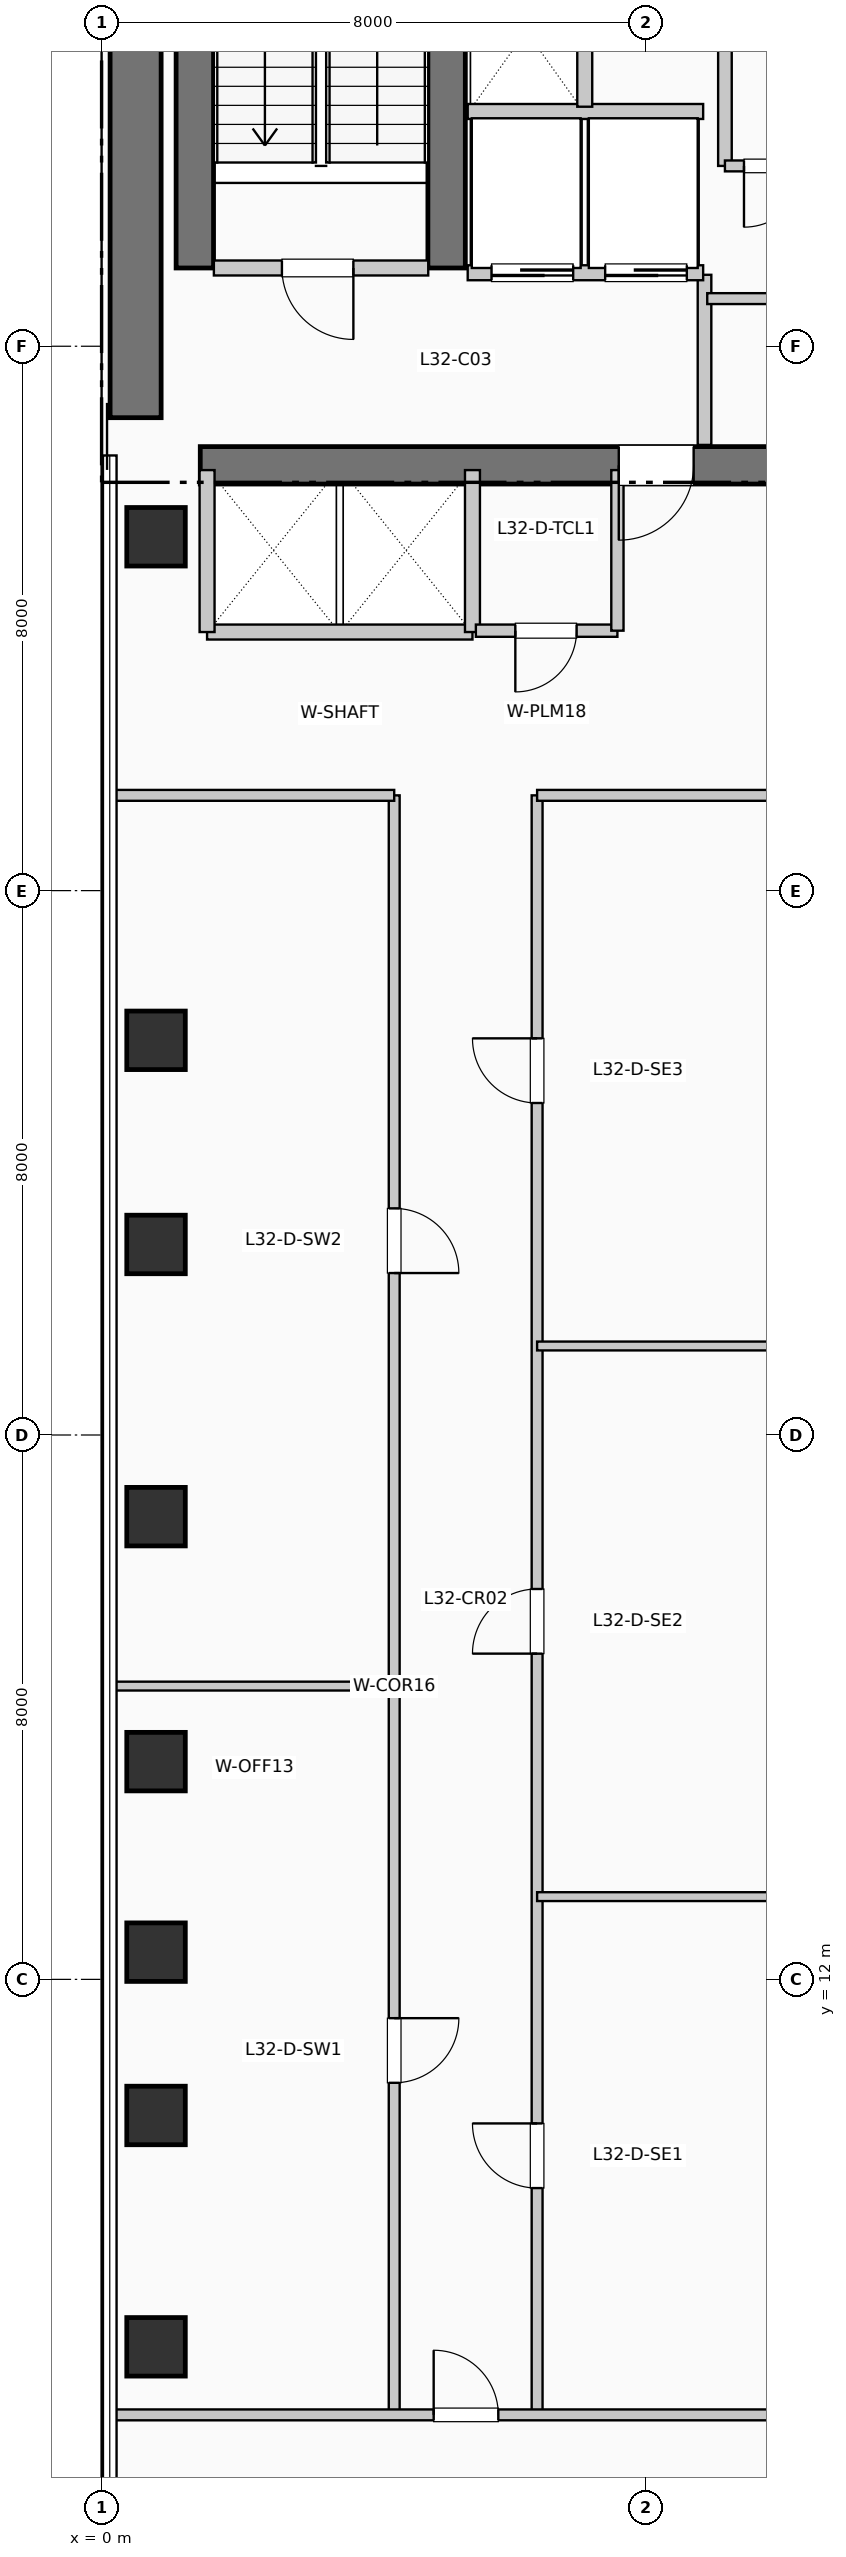
"""IFC4 building model, lengths in metres.
Left out: names, types, materials, properties, quantities, classifications, styles, units other than length and angle.
Written with IfcOpenShell. Run it as: python <this file> out.ifc"""

import sys

from ifc_helpers import new_model, si_unit, direction, frame, frame_2d, origin, origin_2d, place, context, subcontext, project, spatial, rectangle, extrude, element, fill, save


model = new_model("IFC4")
c1 = context("Model", 3, precision=1e-05, world=origin(), true_north=direction((0.0, 1.0)))
c2 = subcontext(c1, "Body", "Model", "MODEL_VIEW")
j1 = project(units=[si_unit("LENGTHUNIT", "METRE"), si_unit("PLANEANGLEUNIT", "RADIAN")], contexts=[c1])
p1 = place(None, origin())
s1 = spatial("IfcSite", under=j1, at=p1, CompositionType="ELEMENT")
p2 = place(p1, origin())
s2 = spatial("IfcBuilding", under=s1, at=p2, CompositionType="ELEMENT")
p3 = place(p2, frame((0.0, 0.0, 134.97)))
s3 = spatial("IfcBuildingStorey", under=s2, at=p3, CompositionType="ELEMENT", Elevation=134.97)
p4 = place(p3, frame((0.5, 34.95, 0.0), z_axis=(0.0, 0.0, 1.0), x_axis=(0.0, 1.0, 0.0)))
e1 = element("IfcWall", 1, at=p4, inside=s3, PredefinedType="SHEAR", context=c2, shape_type="SweptSolid", body=[
    extrude(rectangle(XDim=7.9, YDim=0.75, at=frame_2d((3.95, 0.0))), origin(), (0.0, 0.0, 1.0), 3.96),
])
p5 = place(p3, frame((1.45, 34.25, 0.0), z_axis=(0.0, 0.0, 1.0), x_axis=(1.0, 0.0, 0.0)))
e2 = element("IfcWall", 2, at=p5, inside=s3, PredefinedType="SHEAR", context=c2, shape_type="SweptSolid", body=[
    extrude(rectangle(XDim=10.71, YDim=0.55, at=frame_2d((5.355, 0.0))), origin(), (0.0, 0.0, 1.0), 3.96),
])
p6 = place(p5, frame((7.25, 0.0, 0.0), z_axis=(0.0, 0.0, 1.0), x_axis=(-1.0, 0.0, 0.0)))
e3 = element("IfcOpeningElement", 3, at=p6, cuts=e2, PredefinedType="OPENING", context=c2, shape_type="SweptSolid", body=[
    extrude(rectangle(XDim=1.1, YDim=2.15, at=frame_2d((0.55, 1.075))), frame((0.0, 0.285, 0.0), z_axis=(0.0, -1.0, 0.0), x_axis=(1.0, 0.0, 0.0)), (0.0, 0.0, 1.0), 0.57),
])
for number, where, z_axis, x_axis in (
    (4, (1.37, 37.15, 0.0), (0.0, 0.0, 1.0), (0.0, 1.0, 0.0)),
    (5, (5.07, 37.15, 0.0), (0.0, 0.0, 1.0), (0.0, 1.0, 0.0)),
):
    element("IfcWall", number, at=place(p3, frame(where, z_axis=z_axis, x_axis=x_axis)), inside=s3, PredefinedType="SHEAR", context=c2, shape_type="SweptSolid", body=[
        extrude(rectangle(XDim=7.89, YDim=0.55, at=frame_2d((3.945, 0.0))), origin(), (0.0, 0.0, 1.0), 3.96),
    ])
for number, where, z_axis, x_axis in (
    (6, (0.8, 6.6, 0.0), (0.0, 0.0, 1.0), (1.0, 0.0, 0.0)),
    (7, (0.8, 10.0, 0.0), (0.0, 0.0, 1.0), (1.0, 0.0, 0.0)),
    (8, (0.8, 12.4, 0.0), (0.0, 0.0, 1.0), (1.0, 0.0, 0.0)),
    (9, (0.8, 15.2, 0.0), (0.0, 0.0, 1.0), (1.0, 0.0, 0.0)),
    (10, (0.8, 18.8, 0.0), (0.0, 0.0, 1.0), (1.0, 0.0, 0.0)),
    (11, (0.8, 22.8, 0.0), (0.0, 0.0, 1.0), (1.0, 0.0, 0.0)),
    (12, (0.8, 25.8, 0.0), (0.0, 0.0, 1.0), (1.0, 0.0, 0.0)),
    (13, (0.8, 33.2, 0.0), (0.0, 0.0, 1.0), (1.0, 0.0, 0.0)),
):
    element("IfcColumn", number, at=place(p3, frame(where, z_axis=z_axis, x_axis=x_axis)), inside=s3, PredefinedType="COLUMN", context=c2, shape_type="SweptSolid", body=[
        extrude(rectangle(XDim=0.86, YDim=0.86, at=origin_2d()), origin(), (0.0, 0.0, 1.0), 3.96),
    ])
p7 = place(p3, frame((1.65, 37.15, 0.0), z_axis=(0.0, 0.0, 1.0), x_axis=(1.0, 0.0, 0.0)))
e14 = element("IfcWall", 14, at=p7, inside=s3, PredefinedType="PARTITIONING", context=c2, shape_type="SweptSolid", body=[
    extrude(rectangle(XDim=3.15, YDim=0.22, at=frame_2d((1.575, 0.0))), origin(), (0.0, 0.0, 1.0), 3.71),
])
p8 = place(p7, frame((2.05, 0.0, 0.0), z_axis=(0.0, 0.0, 1.0), x_axis=(-1.0, 0.0, 0.0)))
e15 = element("IfcOpeningElement", 15, at=p8, cuts=e14, PredefinedType="OPENING", context=c2, shape_type="SweptSolid", body=[
    extrude(rectangle(XDim=1.05, YDim=2.15, at=frame_2d((0.525, 1.075))), frame((0.0, 0.12, 0.0), z_axis=(0.0, -1.0, 0.0), x_axis=(1.0, 0.0, 0.0)), (0.0, 0.0, 1.0), 0.24),
])
p9 = place(p3, frame((8.86, 34.55, 0.0), z_axis=(0.0, 0.0, 1.0), x_axis=(0.0, 1.0, 0.0)))
e16 = element("IfcWall", 16, at=p9, inside=s3, PredefinedType="PARTITIONING", context=c2, shape_type="SweptSolid", body=[
    extrude(rectangle(XDim=2.5, YDim=0.2, at=frame_2d((1.25, 0.0))), origin(), (0.0, 0.0, 1.0), 3.71),
])
p10 = place(p3, frame((5.38, 37.08, 0.0), z_axis=(0.0, 0.0, 1.0), x_axis=(1.0, 0.0, 0.0)))
e17 = element("IfcWall", 17, at=p10, inside=s3, PredefinedType="PARTITIONING", context=c2, shape_type="SweptSolid", body=[
    extrude(rectangle(XDim=3.46, YDim=0.22, at=frame_2d((1.73, 0.0))), origin(), (0.0, 0.0, 1.0), 3.71),
])
p11 = place(p10, frame((1.55, 0.0, 0.0), z_axis=(0.0, 0.0, 1.0), x_axis=(-1.0, 0.0, 0.0)))
e18 = element("IfcOpeningElement", 18, at=p11, cuts=e17, PredefinedType="OPENING", context=c2, shape_type="SweptSolid", body=[
    extrude(rectangle(XDim=1.2, YDim=2.2, at=frame_2d((0.6, 1.1))), frame((0.0, 0.12, 0.0), z_axis=(0.0, -1.0, 0.0), x_axis=(1.0, 0.0, 0.0)), (0.0, 0.0, 1.0), 0.24),
])
p12 = place(p10, frame((3.22, 0.0, 0.0), z_axis=(0.0, 0.0, 1.0), x_axis=(-1.0, 0.0, 0.0)))
e19 = element("IfcOpeningElement", 19, at=p12, cuts=e17, PredefinedType="OPENING", context=c2, shape_type="SweptSolid", body=[
    extrude(rectangle(XDim=1.2, YDim=2.2, at=frame_2d((0.6, 1.1))), frame((0.0, 0.12, 0.0), z_axis=(0.0, -1.0, 0.0), x_axis=(1.0, 0.0, 0.0)), (0.0, 0.0, 1.0), 0.24),
])
p13 = place(p3, frame((5.38, 39.45, 0.0), z_axis=(0.0, 0.0, 1.0), x_axis=(1.0, 0.0, 0.0)))
e20 = element("IfcWall", 20, at=p13, inside=s3, PredefinedType="PARTITIONING", context=c2, shape_type="SweptSolid", body=[
    extrude(rectangle(XDim=3.46, YDim=0.22, at=frame_2d((1.73, 0.0))), origin(), (0.0, 0.0, 1.0), 3.71),
])
p14 = place(p3, frame((7.1, 39.52, 0.0), z_axis=(0.0, 0.0, 1.0), x_axis=(0.0, 1.0, 0.0)))
e21 = element("IfcWall", 21, at=p14, inside=s3, PredefinedType="PARTITIONING", context=c2, shape_type="SweptSolid", body=[
    extrude(rectangle(XDim=2.93, YDim=0.22, at=frame_2d((1.465, 0.0))), origin(), (0.0, 0.0, 1.0), 3.71),
])
p15 = place(p3, frame((1.55, 31.8, 0.0), z_axis=(0.0, 0.0, 1.0), x_axis=(1.0, 0.0, 0.0)))
e22 = element("IfcWall", 22, at=p15, inside=s3, PredefinedType="PARTITIONING", context=c2, shape_type="SweptSolid", body=[
    extrude(rectangle(XDim=3.9, YDim=0.22, at=frame_2d((1.95, 0.0))), origin(), (0.0, 0.0, 1.0), 3.71),
])
for number, where, z_axis, x_axis in (
    (23, (1.55, 31.8, 0.0), (0.0, 0.0, 1.0), (0.0, 1.0, 0.0)),
    (24, (5.45, 31.8, 0.0), (0.0, 0.0, 1.0), (0.0, 1.0, 0.0)),
):
    element("IfcWall", number, at=place(p3, frame(where, z_axis=z_axis, x_axis=x_axis)), inside=s3, PredefinedType="PARTITIONING", context=c2, shape_type="SweptSolid", body=[
        extrude(rectangle(XDim=2.38, YDim=0.22, at=frame_2d((1.19, 0.0))), origin(), (0.0, 0.0, 1.0), 3.71),
    ])
p16 = place(p3, frame((9.16, 38.65, 0.0), z_axis=(0.0, 0.0, 1.0), x_axis=(0.0, 1.0, 0.0)))
e25 = element("IfcWall", 25, at=p16, inside=s3, PredefinedType="PARTITIONING", context=c2, shape_type="SweptSolid", body=[
    extrude(rectangle(XDim=2.35, YDim=0.2, at=frame_2d((1.175, 0.0))), origin(), (0.0, 0.0, 1.0), 3.71),
])
p17 = place(p3, frame((5.5, 31.82, 0.0), z_axis=(0.0, 0.0, 1.0), x_axis=(1.0, 0.0, 0.0)))
e26 = element("IfcWall", 26, at=p17, inside=s3, PredefinedType="PLUMBINGWALL", context=c2, shape_type="SweptSolid", body=[
    extrude(rectangle(XDim=2.08, YDim=0.18, at=frame_2d((1.04, 0.0))), origin(), (0.0, 0.0, 1.0), 3.71),
])
p18 = place(p17, frame((1.48, 0.0, 0.0), z_axis=(0.0, 0.0, 1.0), x_axis=(-1.0, 0.0, 0.0)))
e27 = element("IfcOpeningElement", 27, at=p18, cuts=e26, PredefinedType="OPENING", context=c2, shape_type="SweptSolid", body=[
    extrude(rectangle(XDim=0.9, YDim=2.1, at=frame_2d((0.45, 1.05))), frame((0.0, 0.1, 0.0), z_axis=(0.0, -1.0, 0.0), x_axis=(1.0, 0.0, 0.0)), (0.0, 0.0, 1.0), 0.2),
])
p19 = place(p3, frame((7.58, 31.82, 0.0), z_axis=(0.0, 0.0, 1.0), x_axis=(0.0, 1.0, 0.0)))
e28 = element("IfcWall", 28, at=p19, inside=s3, PredefinedType="PLUMBINGWALL", context=c2, shape_type="SweptSolid", body=[
    extrude(rectangle(XDim=2.36, YDim=0.18, at=frame_2d((1.18, 0.0))), origin(), (0.0, 0.0, 1.0), 3.71),
])
p20 = place(p3, frame((8.9, 36.7, 0.0), z_axis=(0.0, 0.0, 1.0), x_axis=(1.0, 0.0, 0.0)))
e29 = element("IfcWall", 29, at=p20, inside=s3, PredefinedType="PARTITIONING", context=c2, shape_type="SweptSolid", body=[
    extrude(rectangle(XDim=3.25, YDim=0.16, at=frame_2d((1.625, 0.0))), origin(), (0.0, 0.0, 1.0), 3.71),
])
p21 = place(p20, frame((1.1, 0.0, 0.0)))
e30 = element("IfcOpeningElement", 30, at=p21, cuts=e29, PredefinedType="OPENING", context=c2, shape_type="SweptSolid", body=[
    extrude(rectangle(XDim=0.95, YDim=2.15, at=frame_2d((0.475, 1.075))), frame((0.0, 0.09, 0.0), z_axis=(0.0, -1.0, 0.0), x_axis=(1.0, 0.0, 0.0)), (0.0, 0.0, 1.0), 0.18),
])
p22 = place(p3, frame((9.16, 38.65, 0.0), z_axis=(0.0, 0.0, 1.0), x_axis=(1.0, 0.0, 0.0)))
e31 = element("IfcWall", 31, at=p22, inside=s3, PredefinedType="PARTITIONING", context=c2, shape_type="SweptSolid", body=[
    extrude(rectangle(XDim=3.42, YDim=0.16, at=frame_2d((1.71, 0.0))), origin(), (0.0, 0.0, 1.0), 3.71),
])
p23 = place(p22, frame((1.18, 0.0, 0.0), z_axis=(0.0, 0.0, 1.0), x_axis=(-1.0, 0.0, 0.0)))
e32 = element("IfcOpeningElement", 32, at=p23, cuts=e31, PredefinedType="OPENING", context=c2, shape_type="SweptSolid", body=[
    extrude(rectangle(XDim=0.9, YDim=2.15, at=frame_2d((0.45, 1.075))), frame((0.0, 0.09, 0.0), z_axis=(0.0, -1.0, 0.0), x_axis=(1.0, 0.0, 0.0)), (0.0, 0.0, 1.0), 0.18),
])
p24 = place(p22, frame((2.6, 0.0, 0.0), z_axis=(0.0, 0.0, 1.0), x_axis=(-1.0, 0.0, 0.0)))
e33 = element("IfcOpeningElement", 33, at=p24, cuts=e31, PredefinedType="OPENING", context=c2, shape_type="SweptSolid", body=[
    extrude(rectangle(XDim=0.9, YDim=2.15, at=frame_2d((0.45, 1.075))), frame((0.0, 0.09, 0.0), z_axis=(0.0, -1.0, 0.0), x_axis=(1.0, 0.0, 0.0)), (0.0, 0.0, 1.0), 0.18),
])
p25 = place(p3, frame((4.3, 5.6, 0.0), z_axis=(0.0, 0.0, 1.0), x_axis=(0.0, 1.0, 0.0)))
e34 = element("IfcWall", 34, at=p25, inside=s3, PredefinedType="PARTITIONING", context=c2, shape_type="SweptSolid", body=[
    extrude(rectangle(XDim=23.8, YDim=0.16, at=frame_2d((11.9, 0.0))), origin(), (0.0, 0.0, 1.0), 3.71),
])
p26 = place(p25, frame((5.83, 0.0, 0.0), z_axis=(0.0, 0.0, 1.0), x_axis=(-1.0, 0.0, 0.0)))
e35 = element("IfcOpeningElement", 35, at=p26, cuts=e34, PredefinedType="OPENING", context=c2, shape_type="SweptSolid", body=[
    extrude(rectangle(XDim=0.95, YDim=2.15, at=frame_2d((0.475, 1.075))), frame((0.0, 0.09, 0.0), z_axis=(0.0, -1.0, 0.0), x_axis=(1.0, 0.0, 0.0)), (0.0, 0.0, 1.0), 0.18),
])
p27 = place(p25, frame((17.73, 0.0, 0.0), z_axis=(0.0, 0.0, 1.0), x_axis=(-1.0, 0.0, 0.0)))
e36 = element("IfcOpeningElement", 36, at=p27, cuts=e34, PredefinedType="OPENING", context=c2, shape_type="SweptSolid", body=[
    extrude(rectangle(XDim=0.95, YDim=2.15, at=frame_2d((0.475, 1.075))), frame((0.0, 0.09, 0.0), z_axis=(0.0, -1.0, 0.0), x_axis=(1.0, 0.0, 0.0)), (0.0, 0.0, 1.0), 0.18),
])
p28 = place(p3, frame((6.4, 5.6, 0.0), z_axis=(0.0, 0.0, 1.0), x_axis=(0.0, 1.0, 0.0)))
e37 = element("IfcWall", 37, at=p28, inside=s3, PredefinedType="PARTITIONING", context=c2, shape_type="SweptSolid", body=[
    extrude(rectangle(XDim=23.8, YDim=0.16, at=frame_2d((11.9, 0.0))), origin(), (0.0, 0.0, 1.0), 3.71),
])
p29 = place(p28, frame((3.333, 0.0, 0.0)))
e38 = element("IfcOpeningElement", 38, at=p29, cuts=e37, PredefinedType="OPENING", context=c2, shape_type="SweptSolid", body=[
    extrude(rectangle(XDim=0.95, YDim=2.15, at=frame_2d((0.475, 1.075))), frame((0.0, 0.09, 0.0), z_axis=(0.0, -1.0, 0.0), x_axis=(1.0, 0.0, 0.0)), (0.0, 0.0, 1.0), 0.18),
])
p30 = place(p28, frame((11.187, 0.0, 0.0)))
e39 = element("IfcOpeningElement", 39, at=p30, cuts=e37, PredefinedType="OPENING", context=c2, shape_type="SweptSolid", body=[
    extrude(rectangle(XDim=0.95, YDim=2.15, at=frame_2d((0.475, 1.075))), frame((0.0, 0.09, 0.0), z_axis=(0.0, -1.0, 0.0), x_axis=(1.0, 0.0, 0.0)), (0.0, 0.0, 1.0), 0.18),
])
p31 = place(p28, frame((19.279, 0.0, 0.0)))
e40 = element("IfcOpeningElement", 40, at=p31, cuts=e37, PredefinedType="OPENING", context=c2, shape_type="SweptSolid", body=[
    extrude(rectangle(XDim=0.95, YDim=2.15, at=frame_2d((0.475, 1.075))), frame((0.0, 0.09, 0.0), z_axis=(0.0, -1.0, 0.0), x_axis=(1.0, 0.0, 0.0)), (0.0, 0.0, 1.0), 0.18),
])
p32 = place(p3, frame((0.19, 5.6, 0.0), z_axis=(0.0, 0.0, 1.0), x_axis=(1.0, 0.0, 0.0)))
e41 = element("IfcWall", 41, at=p32, inside=s3, PredefinedType="PARTITIONING", context=c2, shape_type="SweptSolid", body=[
    extrude(rectangle(XDim=23.26, YDim=0.16, at=frame_2d((11.63, 0.0))), origin(), (0.0, 0.0, 1.0), 3.71),
])
p33 = place(p32, frame((4.69, 0.0, 0.0)))
e42 = element("IfcOpeningElement", 42, at=p33, cuts=e41, PredefinedType="OPENING", context=c2, shape_type="SweptSolid", body=[
    extrude(rectangle(XDim=0.95, YDim=2.15, at=frame_2d((0.475, 1.075))), frame((0.0, 0.09, 0.0), z_axis=(0.0, -1.0, 0.0), x_axis=(1.0, 0.0, 0.0)), (0.0, 0.0, 1.0), 0.18),
])
p34 = place(p3, frame((0.19, 29.4, 0.0), z_axis=(0.0, 0.0, 1.0), x_axis=(1.0, 0.0, 0.0)))
e43 = element("IfcWall", 43, at=p34, inside=s3, PredefinedType="PARTITIONING", context=c2, shape_type="SweptSolid", body=[
    extrude(rectangle(XDim=4.11, YDim=0.16, at=frame_2d((2.055, 0.0))), origin(), (0.0, 0.0, 1.0), 3.365),
])
p35 = place(p3, frame((6.4, 29.4, 0.0), z_axis=(0.0, 0.0, 1.0), x_axis=(1.0, 0.0, 0.0)))
e44 = element("IfcWall", 44, at=p35, inside=s3, PredefinedType="PARTITIONING", context=c2, shape_type="SweptSolid", body=[
    extrude(rectangle(XDim=17.05, YDim=0.16, at=frame_2d((8.525, 0.0))), origin(), (0.0, 0.0, 1.0), 3.365),
])
p36 = place(p3, frame((0.19, 16.31, 0.0), z_axis=(0.0, 0.0, 1.0), x_axis=(1.0, 0.0, 0.0)))
e45 = element("IfcWall", 45, at=p36, inside=s3, PredefinedType="PARTITIONING", context=c2, shape_type="SweptSolid", body=[
    extrude(rectangle(XDim=4.11, YDim=0.13, at=frame_2d((2.055, 0.0))), origin(), (0.0, 0.0, 1.0), 3.71),
])
for number, where, z_axis, x_axis in (
    (46, (6.4, 13.216, 0.0), (0.0, 0.0, 1.0), (1.0, 0.0, 0.0)),
    (47, (6.4, 21.308, 0.0), (0.0, 0.0, 1.0), (1.0, 0.0, 0.0)),
):
    element("IfcWall", number, at=place(p3, frame(where, z_axis=z_axis, x_axis=x_axis)), inside=s3, PredefinedType="PARTITIONING", context=c2, shape_type="SweptSolid", body=[
        extrude(rectangle(XDim=17.05, YDim=0.13, at=frame_2d((8.525, 0.0))), origin(), (0.0, 0.0, 1.0), 3.71),
    ])
p37 = place(p8, origin())
e48 = element("IfcDoor", 48, at=p37, inside=s3, OperationType="SINGLE_SWING_RIGHT", PredefinedType="DOOR", context=c2, shape_type="SweptSolid", body=[
    extrude(rectangle(XDim=1.05, YDim=2.15, at=frame_2d((0.525, 1.075))), frame((0.0, 0.025, 0.0), z_axis=(0.0, -1.0, 0.0), x_axis=(1.0, 0.0, 0.0)), (0.0, 0.0, 1.0), 0.05),
])
fill(e15, e48)
p38 = place(p6, origin())
e49 = element("IfcDoor", 49, at=p38, inside=s3, OperationType="SINGLE_SWING_LEFT", PredefinedType="DOOR", context=c2, shape_type="SweptSolid", body=[
    extrude(rectangle(XDim=1.1, YDim=2.15, at=frame_2d((0.55, 1.075))), frame((0.0, 0.025, 0.0), z_axis=(0.0, -1.0, 0.0), x_axis=(1.0, 0.0, 0.0)), (0.0, 0.0, 1.0), 0.05),
])
fill(e3, e49)
p39 = place(p11, origin())
e50 = element("IfcDoor", 50, at=p39, inside=s3, OperationType="SLIDING_TO_RIGHT", PredefinedType="DOOR", context=c2, shape_type="SweptSolid", body=[
    extrude(rectangle(XDim=1.2, YDim=2.2, at=frame_2d((0.6, 1.1))), frame((0.0, 0.025, 0.0), z_axis=(0.0, -1.0, 0.0), x_axis=(1.0, 0.0, 0.0)), (0.0, 0.0, 1.0), 0.05),
])
fill(e18, e50)
p40 = place(p12, origin())
e51 = element("IfcDoor", 51, at=p40, inside=s3, OperationType="SLIDING_TO_RIGHT", PredefinedType="DOOR", context=c2, shape_type="SweptSolid", body=[
    extrude(rectangle(XDim=1.2, YDim=2.2, at=frame_2d((0.6, 1.1))), frame((0.0, 0.025, 0.0), z_axis=(0.0, -1.0, 0.0), x_axis=(1.0, 0.0, 0.0)), (0.0, 0.0, 1.0), 0.05),
])
fill(e19, e51)
p41 = place(p18, origin())
e52 = element("IfcDoor", 52, at=p41, inside=s3, OperationType="SINGLE_SWING_LEFT", PredefinedType="DOOR", context=c2, shape_type="SweptSolid", body=[
    extrude(rectangle(XDim=0.9, YDim=2.1, at=frame_2d((0.45, 1.05))), frame((0.0, 0.025, 0.0), z_axis=(0.0, -1.0, 0.0), x_axis=(1.0, 0.0, 0.0)), (0.0, 0.0, 1.0), 0.05),
])
fill(e27, e52)
p42 = place(p23, origin())
e53 = element("IfcDoor", 53, at=p42, inside=s3, OperationType="SINGLE_SWING_LEFT", PredefinedType="DOOR", context=c2, shape_type="SweptSolid", body=[
    extrude(rectangle(XDim=0.9, YDim=2.15, at=frame_2d((0.45, 1.075))), frame((0.0, 0.025, 0.0), z_axis=(0.0, -1.0, 0.0), x_axis=(1.0, 0.0, 0.0)), (0.0, 0.0, 1.0), 0.05),
])
fill(e32, e53)
p43 = place(p33, origin())
e54 = element("IfcDoor", 54, at=p43, inside=s3, OperationType="SINGLE_SWING_LEFT", PredefinedType="DOOR", context=c2, shape_type="SweptSolid", body=[
    extrude(rectangle(XDim=0.95, YDim=2.15, at=frame_2d((0.475, 1.075))), frame((0.0, 0.025, 0.0), z_axis=(0.0, -1.0, 0.0), x_axis=(1.0, 0.0, 0.0)), (0.0, 0.0, 1.0), 0.05),
])
fill(e42, e54)
p44 = place(p26, origin())
e55 = element("IfcDoor", 55, at=p44, inside=s3, OperationType="SINGLE_SWING_RIGHT", PredefinedType="DOOR", context=c2, shape_type="SweptSolid", body=[
    extrude(rectangle(XDim=0.95, YDim=2.15, at=frame_2d((0.475, 1.075))), frame((0.0, 0.025, 0.0), z_axis=(0.0, -1.0, 0.0), x_axis=(1.0, 0.0, 0.0)), (0.0, 0.0, 1.0), 0.05),
])
fill(e35, e55)
p45 = place(p27, origin())
e56 = element("IfcDoor", 56, at=p45, inside=s3, OperationType="SINGLE_SWING_LEFT", PredefinedType="DOOR", context=c2, shape_type="SweptSolid", body=[
    extrude(rectangle(XDim=0.95, YDim=2.15, at=frame_2d((0.475, 1.075))), frame((0.0, 0.025, 0.0), z_axis=(0.0, -1.0, 0.0), x_axis=(1.0, 0.0, 0.0)), (0.0, 0.0, 1.0), 0.05),
])
fill(e36, e56)
p46 = place(p29, origin())
e57 = element("IfcDoor", 57, at=p46, inside=s3, OperationType="SINGLE_SWING_RIGHT", PredefinedType="DOOR", context=c2, shape_type="SweptSolid", body=[
    extrude(rectangle(XDim=0.95, YDim=2.15, at=frame_2d((0.475, 1.075))), frame((0.0, 0.025, 0.0), z_axis=(0.0, -1.0, 0.0), x_axis=(1.0, 0.0, 0.0)), (0.0, 0.0, 1.0), 0.05),
])
fill(e38, e57)
p47 = place(p30, origin())
e58 = element("IfcDoor", 58, at=p47, inside=s3, OperationType="SINGLE_SWING_LEFT", PredefinedType="DOOR", context=c2, shape_type="SweptSolid", body=[
    extrude(rectangle(XDim=0.95, YDim=2.15, at=frame_2d((0.475, 1.075))), frame((0.0, 0.025, 0.0), z_axis=(0.0, -1.0, 0.0), x_axis=(1.0, 0.0, 0.0)), (0.0, 0.0, 1.0), 0.05),
])
fill(e39, e58)
p48 = place(p31, origin())
e59 = element("IfcDoor", 59, at=p48, inside=s3, OperationType="SINGLE_SWING_RIGHT", PredefinedType="DOOR", context=c2, shape_type="SweptSolid", body=[
    extrude(rectangle(XDim=0.95, YDim=2.15, at=frame_2d((0.475, 1.075))), frame((0.0, 0.025, 0.0), z_axis=(0.0, -1.0, 0.0), x_axis=(1.0, 0.0, 0.0)), (0.0, 0.0, 1.0), 0.05),
])
fill(e40, e59)
save(model, sys.argv[1])
